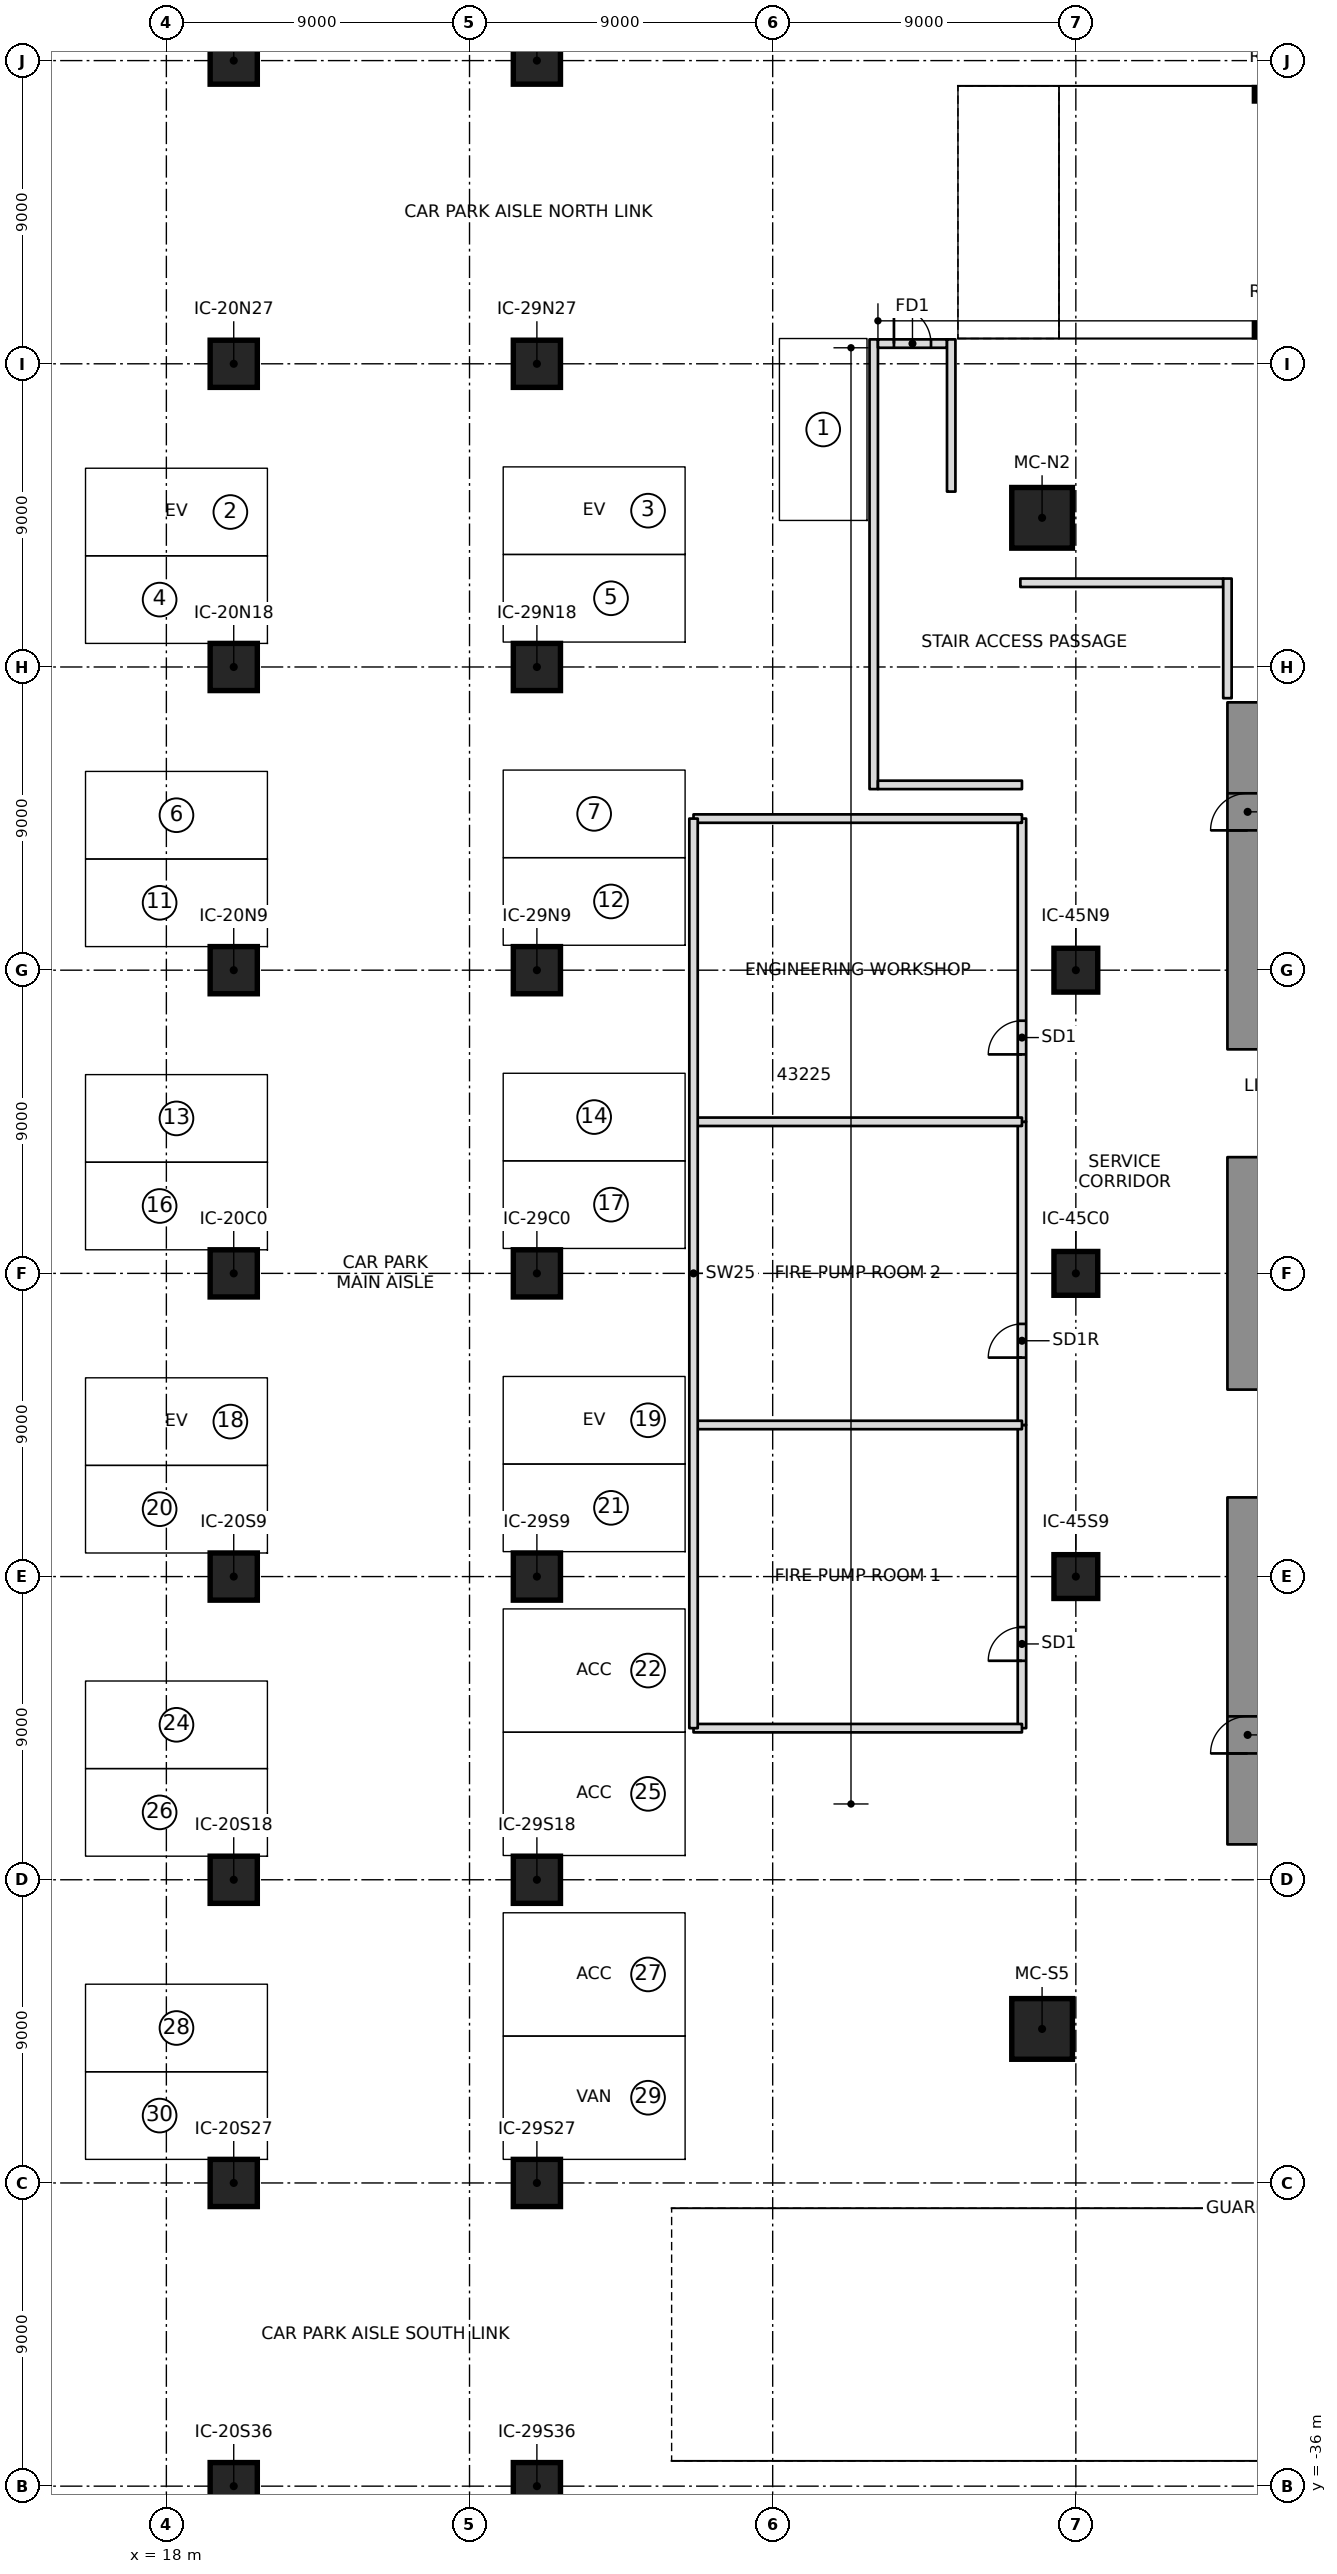
"""IFC4 building model, lengths in metres.
Left out: names, types, materials, properties, quantities, classifications, styles, units other than length and angle.
Written with IfcOpenShell. Run it as: python <this file> out.ifc"""

import sys

from ifc_helpers import new_model, si_unit, direction, frame, frame_2d, origin, origin_2d, place, context, subcontext, project, spatial, polyline, rectangle, outline, extrude, element, fill, save


model = new_model("IFC4")
c1 = context("Model", 3, precision=1e-05, world=origin(), true_north=direction((0.0, 1.0)))
c2 = subcontext(c1, "Body", "Model", "MODEL_VIEW")
j1 = project(units=[si_unit("LENGTHUNIT", "METRE"), si_unit("PLANEANGLEUNIT", "RADIAN")], contexts=[c1])
p1 = place(None, origin())
s1 = spatial("IfcSite", under=j1, at=p1, CompositionType="ELEMENT")
p2 = place(p1, origin())
s2 = spatial("IfcBuilding", under=s1, at=p2, CompositionType="ELEMENT")
p3 = place(p2, frame((0.0, 0.0, -5.0)))
s3 = spatial("IfcBuildingStorey", under=s2, at=p3, CompositionType="ELEMENT", Elevation=-5.0)
p4 = place(p3, frame((50.1, 6.65, 0.0), z_axis=(0.0, 0.0, 1.0), x_axis=(0.0, 1.0, 0.0)))
e1 = element("IfcWall", 1, at=p4, inside=s3, PredefinedType="SHEAR", context=c2, shape_type="SweptSolid", body=[
    extrude(rectangle(XDim=10.3, YDim=1.2, at=frame_2d((5.15, 0.0))), origin(), (0.0, 0.0, 1.0), 5.0),
])
p5 = place(p4, frame((6.5, 0.0, 0.0)))
e2 = element("IfcOpeningElement", 2, at=p5, cuts=e1, PredefinedType="OPENING", context=c2, shape_type="SweptSolid", body=[
    extrude(rectangle(XDim=1.1, YDim=2.1, at=frame_2d((0.55, 1.05))), frame((0.0, 0.61, 0.0), z_axis=(0.0, -1.0, 0.0), x_axis=(1.0, 0.0, 0.0)), (0.0, 0.0, 1.0), 1.22),
])
p6 = place(p3, frame((50.1, -3.45, 0.0), z_axis=(0.0, 0.0, 1.0), x_axis=(0.0, 1.0, 0.0)))
e3 = element("IfcWall", 3, at=p6, inside=s3, PredefinedType="SHEAR", context=c2, shape_type="SweptSolid", body=[
    extrude(rectangle(XDim=6.9, YDim=1.2, at=frame_2d((3.45, 0.0))), origin(), (0.0, 0.0, 1.0), 5.0),
])
p7 = place(p3, frame((50.1, -16.95, 0.0), z_axis=(0.0, 0.0, 1.0), x_axis=(0.0, 1.0, 0.0)))
e4 = element("IfcWall", 4, at=p7, inside=s3, PredefinedType="SHEAR", context=c2, shape_type="SweptSolid", body=[
    extrude(rectangle(XDim=10.3, YDim=1.2, at=frame_2d((5.15, 0.0))), origin(), (0.0, 0.0, 1.0), 5.0),
])
p8 = place(p7, frame((2.7, 0.0, 0.0)))
e5 = element("IfcOpeningElement", 5, at=p8, cuts=e4, PredefinedType="OPENING", context=c2, shape_type="SweptSolid", body=[
    extrude(rectangle(XDim=1.1, YDim=2.1, at=frame_2d((0.55, 1.05))), frame((0.0, 0.61, 0.0), z_axis=(0.0, -1.0, 0.0), x_axis=(1.0, 0.0, 0.0)), (0.0, 0.0, 1.0), 1.22),
])
for number, where, z_axis, x_axis in (
    (6, (43.998, -22.428, 0.0), (0.0, 0.0, 1.0), (1.0, 0.0, 0.0)),
    (7, (43.998, 22.428, 0.0), (0.0, 0.0, 1.0), (1.0, 0.0, 0.0)),
):
    element("IfcColumn", number, at=place(p3, frame(where, z_axis=z_axis, x_axis=x_axis)), inside=s3, PredefinedType="COLUMN", context=c2, shape_type="SweptSolid", body=[
        extrude(rectangle(XDim=1.8, YDim=1.8, at=origin_2d()), origin(), (0.0, 0.0, 1.0), 5.0),
    ])
for number, where, z_axis, x_axis in (
    (8, (20.0, -36.0, 0.0), (0.0, 0.0, 1.0), (1.0, 0.0, 0.0)),
    (9, (20.0, -27.0, 0.0), (0.0, 0.0, 1.0), (1.0, 0.0, 0.0)),
    (10, (20.0, -18.0, 0.0), (0.0, 0.0, 1.0), (1.0, 0.0, 0.0)),
    (11, (20.0, -9.0, 0.0), (0.0, 0.0, 1.0), (1.0, 0.0, 0.0)),
    (12, (20.0, 0.0, 0.0), (0.0, 0.0, 1.0), (1.0, 0.0, 0.0)),
    (13, (20.0, 9.0, 0.0), (0.0, 0.0, 1.0), (1.0, 0.0, 0.0)),
    (14, (20.0, 18.0, 0.0), (0.0, 0.0, 1.0), (1.0, 0.0, 0.0)),
    (15, (20.0, 27.0, 0.0), (0.0, 0.0, 1.0), (1.0, 0.0, 0.0)),
    (16, (20.0, 36.0, 0.0), (0.0, 0.0, 1.0), (1.0, 0.0, 0.0)),
    (17, (29.0, -36.0, 0.0), (0.0, 0.0, 1.0), (1.0, 0.0, 0.0)),
    (18, (29.0, -27.0, 0.0), (0.0, 0.0, 1.0), (1.0, 0.0, 0.0)),
    (19, (29.0, -18.0, 0.0), (0.0, 0.0, 1.0), (1.0, 0.0, 0.0)),
    (20, (29.0, -9.0, 0.0), (0.0, 0.0, 1.0), (1.0, 0.0, 0.0)),
    (21, (29.0, 0.0, 0.0), (0.0, 0.0, 1.0), (1.0, 0.0, 0.0)),
    (22, (29.0, 9.0, 0.0), (0.0, 0.0, 1.0), (1.0, 0.0, 0.0)),
    (23, (29.0, 18.0, 0.0), (0.0, 0.0, 1.0), (1.0, 0.0, 0.0)),
    (24, (29.0, 27.0, 0.0), (0.0, 0.0, 1.0), (1.0, 0.0, 0.0)),
    (25, (29.0, 36.0, 0.0), (0.0, 0.0, 1.0), (1.0, 0.0, 0.0)),
):
    element("IfcColumn", number, at=place(p3, frame(where, z_axis=z_axis, x_axis=x_axis)), inside=s3, PredefinedType="COLUMN", context=c2, shape_type="SweptSolid", body=[
        extrude(rectangle(XDim=1.4, YDim=1.4, at=origin_2d()), origin(), (0.0, 0.0, 1.0), 4.35),
    ])
for number, where, z_axis, x_axis in (
    (26, (45.0, -9.0, 0.0), (0.0, 0.0, 1.0), (1.0, 0.0, 0.0)),
    (27, (45.0, 0.0, 0.0), (0.0, 0.0, 1.0), (1.0, 0.0, 0.0)),
    (28, (45.0, 9.0, 0.0), (0.0, 0.0, 1.0), (1.0, 0.0, 0.0)),
):
    element("IfcColumn", number, at=place(p3, frame(where, z_axis=z_axis, x_axis=x_axis)), inside=s3, PredefinedType="COLUMN", context=c2, shape_type="SweptSolid", body=[
        extrude(rectangle(XDim=1.3, YDim=1.3, at=origin_2d()), origin(), (0.0, 0.0, 1.0), 5.0),
    ])
p9 = place(p2, frame((0.0, 0.0, -10.0)))
s4 = spatial("IfcBuildingStorey", under=s2, at=p9, CompositionType="ELEMENT", Elevation=-10.0)
for number, where, z_axis, x_axis in (
    (29, (41.69, -21.429, -0.3), (0.0, 0.0, 1.0), (0.888, -0.459, 0.0)),
    (30, (41.69, 21.429, -0.3), (0.0, 0.0, 1.0), (0.888, 0.459, 0.0)),
):
    element("IfcWall", number, at=place(p9, frame(where, z_axis=z_axis, x_axis=x_axis)), inside=s4, PredefinedType="SHEAR", context=c2, shape_type="SweptSolid", body=[
        extrude(rectangle(XDim=1.529, YDim=3.4, at=frame_2d((0.764, 0.0))), origin(), (0.0, 0.0, 1.0), 15.3),
    ])
for number, where, z_axis, x_axis in (
    (31, (50.5, 28.0, 0.0), (0.0, 0.0, 1.0), (1.0, 0.0, 0.0)),
    (32, (50.5, 35.0, 0.0), (0.0, 0.0, 1.0), (1.0, 0.0, 0.0)),
):
    element("IfcColumn", number, at=place(p3, frame(where, z_axis=z_axis, x_axis=x_axis)), inside=s3, PredefinedType="COLUMN", context=c2, shape_type="SweptSolid", body=[
        extrude(rectangle(XDim=0.4, YDim=0.4, at=origin_2d()), origin(), (0.0, 0.0, 1.0), 0.747),
    ])
p10 = place(p3, frame((43.4, -13.5, 0.0), z_axis=(0.0, 0.0, 1.0), x_axis=(0.0, 1.0, 0.0)))
e33 = element("IfcWall", 33, at=p10, inside=s3, PredefinedType="PARTITIONING", context=c2, shape_type="SweptSolid", body=[
    extrude(rectangle(XDim=9.0, YDim=0.25, at=frame_2d((4.5, 0.0))), origin(), (0.0, 0.0, 1.0), 4.65),
])
p11 = place(p10, frame((2.0, 0.0, 0.0)))
e34 = element("IfcOpeningElement", 34, at=p11, cuts=e33, PredefinedType="OPENING", context=c2, shape_type="SweptSolid", body=[
    extrude(rectangle(XDim=1.0, YDim=2.1, at=frame_2d((0.5, 1.05))), frame((0.0, 0.135, 0.0), z_axis=(0.0, -1.0, 0.0), x_axis=(1.0, 0.0, 0.0)), (0.0, 0.0, 1.0), 0.27),
])
p12 = place(p3, frame((43.4, -4.5, 0.0), z_axis=(0.0, 0.0, 1.0), x_axis=(0.0, 1.0, 0.0)))
e35 = element("IfcWall", 35, at=p12, inside=s3, PredefinedType="PARTITIONING", context=c2, shape_type="SweptSolid", body=[
    extrude(rectangle(XDim=9.0, YDim=0.25, at=frame_2d((4.5, 0.0))), origin(), (0.0, 0.0, 1.0), 4.65),
])
p13 = place(p12, frame((2.0, 0.0, 0.0)))
e36 = element("IfcOpeningElement", 36, at=p13, cuts=e35, PredefinedType="OPENING", context=c2, shape_type="SweptSolid", body=[
    extrude(rectangle(XDim=1.0, YDim=2.1, at=frame_2d((0.5, 1.05))), frame((0.0, 0.135, 0.0), z_axis=(0.0, -1.0, 0.0), x_axis=(1.0, 0.0, 0.0)), (0.0, 0.0, 1.0), 0.27),
])
p14 = place(p3, frame((33.65, -4.5, 0.0), z_axis=(0.0, 0.0, 1.0), x_axis=(1.0, 0.0, 0.0)))
e37 = element("IfcWall", 37, at=p14, inside=s3, PredefinedType="PARTITIONING", context=c2, shape_type="SweptSolid", body=[
    extrude(rectangle(XDim=9.75, YDim=0.25, at=frame_2d((4.875, 0.0))), origin(), (0.0, 0.0, 1.0), 4.65),
])
p15 = place(p3, frame((43.4, 4.5, 0.0), z_axis=(0.0, 0.0, 1.0), x_axis=(0.0, 1.0, 0.0)))
e38 = element("IfcWall", 38, at=p15, inside=s3, PredefinedType="PARTITIONING", context=c2, shape_type="SweptSolid", body=[
    extrude(rectangle(XDim=9.0, YDim=0.25, at=frame_2d((4.5, 0.0))), origin(), (0.0, 0.0, 1.0), 4.65),
])
p16 = place(p15, frame((2.0, 0.0, 0.0)))
e39 = element("IfcOpeningElement", 39, at=p16, cuts=e38, PredefinedType="OPENING", context=c2, shape_type="SweptSolid", body=[
    extrude(rectangle(XDim=1.0, YDim=2.1, at=frame_2d((0.5, 1.05))), frame((0.0, 0.135, 0.0), z_axis=(0.0, -1.0, 0.0), x_axis=(1.0, 0.0, 0.0)), (0.0, 0.0, 1.0), 0.27),
])
for number, where, z_axis, x_axis in (
    (40, (33.65, 4.5, 0.0), (0.0, 0.0, 1.0), (1.0, 0.0, 0.0)),
    (41, (33.65, -13.5, 0.0), (0.0, 0.0, 1.0), (1.0, 0.0, 0.0)),
    (42, (33.65, 13.5, 0.0), (0.0, 0.0, 1.0), (1.0, 0.0, 0.0)),
):
    element("IfcWall", number, at=place(p3, frame(where, z_axis=z_axis, x_axis=x_axis)), inside=s3, PredefinedType="PARTITIONING", context=c2, shape_type="SweptSolid", body=[
        extrude(rectangle(XDim=9.75, YDim=0.25, at=frame_2d((4.875, 0.0))), origin(), (0.0, 0.0, 1.0), 4.65),
    ])
p17 = place(p3, frame((33.65, -13.5, 0.0), z_axis=(0.0, 0.0, 1.0), x_axis=(0.0, 1.0, 0.0)))
e43 = element("IfcWall", 43, at=p17, inside=s3, PredefinedType="PARTITIONING", context=c2, shape_type="SweptSolid", body=[
    extrude(rectangle(XDim=27.0, YDim=0.25, at=frame_2d((13.5, 0.0))), origin(), (0.0, 0.0, 1.0), 4.65),
])
p18 = place(p3, frame((39.0, 14.375, 0.0), z_axis=(0.0, 0.0, 1.0), x_axis=(0.0, 1.0, 0.0)))
e44 = element("IfcWall", 44, at=p18, inside=s3, PredefinedType="PARTITIONING", context=c2, shape_type="SweptSolid", body=[
    extrude(rectangle(XDim=13.35, YDim=0.25, at=frame_2d((6.675, 0.0))), origin(), (0.0, 0.0, 1.0), 4.65),
])
p19 = place(p3, frame((39.125, 14.5, 0.0), z_axis=(0.0, 0.0, 1.0), x_axis=(1.0, 0.0, 0.0)))
e45 = element("IfcWall", 45, at=p19, inside=s3, PredefinedType="PARTITIONING", context=c2, shape_type="SweptSolid", body=[
    extrude(rectangle(XDim=4.275, YDim=0.25, at=frame_2d((2.137, 0.0))), origin(), (0.0, 0.0, 1.0), 4.65),
])
p20 = place(p3, frame((39.125, 27.6, 0.0), z_axis=(0.0, 0.0, 1.0), x_axis=(1.0, 0.0, 0.0)))
e46 = element("IfcWall", 46, at=p20, inside=s3, PredefinedType="PARTITIONING", context=c2, shape_type="SweptSolid", body=[
    extrude(rectangle(XDim=2.05, YDim=0.25, at=frame_2d((1.025, 0.0))), origin(), (0.0, 0.0, 1.0), 4.65),
])
p21 = place(p20, frame((0.475, 0.0, 0.0)))
e47 = element("IfcOpeningElement", 47, at=p21, cuts=e46, PredefinedType="OPENING", context=c2, shape_type="SweptSolid", body=[
    extrude(rectangle(XDim=1.1, YDim=2.1, at=frame_2d((0.55, 1.05))), frame((0.0, 0.135, 0.0), z_axis=(0.0, -1.0, 0.0), x_axis=(1.0, 0.0, 0.0)), (0.0, 0.0, 1.0), 0.27),
])
p22 = place(p3, frame((41.3, 23.141, 0.0), z_axis=(0.0, 0.0, 1.0), x_axis=(0.0, 1.0, 0.0)))
e48 = element("IfcWall", 48, at=p22, inside=s3, PredefinedType="PARTITIONING", context=c2, shape_type="SweptSolid", body=[
    extrude(outline(polyline([(0.065, -0.125), (4.584, -0.125), (4.584, 0.125), (-0.065, 0.125), (0.065, -0.125)])), origin(), (0.0, 0.0, 1.0), 4.65),
])
p23 = place(p3, frame((43.595, 20.5, 0.0), z_axis=(0.0, 0.0, 1.0), x_axis=(1.0, 0.0, 0.0)))
e49 = element("IfcWall", 49, at=p23, inside=s3, PredefinedType="PARTITIONING", context=c2, shape_type="SweptSolid", body=[
    extrude(outline(polyline([(-0.242, -0.125), (5.78, -0.125), (5.78, 0.125), (0.242, 0.125), (-0.242, -0.125)])), origin(), (0.0, 0.0, 1.0), 4.65),
])
p24 = place(p3, frame((49.5, 17.074, 0.0), z_axis=(0.0, 0.0, 1.0), x_axis=(0.0, 1.0, 0.0)))
e50 = element("IfcWall", 50, at=p24, inside=s3, PredefinedType="PARTITIONING", context=c2, shape_type="SweptSolid", body=[
    extrude(rectangle(XDim=3.551, YDim=0.25, at=frame_2d((1.775, 0.0))), origin(), (0.0, 0.0, 1.0), 4.65),
])
p25 = place(p5, origin())
e51 = element("IfcDoor", 51, at=p25, inside=s3, OperationType="SINGLE_SWING_RIGHT", PredefinedType="DOOR", context=c2, shape_type="SweptSolid", body=[
    extrude(rectangle(XDim=1.1, YDim=2.1, at=frame_2d((0.55, 1.05))), frame((0.0, 0.025, 0.0), z_axis=(0.0, -1.0, 0.0), x_axis=(1.0, 0.0, 0.0)), (0.0, 0.0, 1.0), 0.05),
])
fill(e2, e51)
p26 = place(p8, origin())
e52 = element("IfcDoor", 52, at=p26, inside=s3, OperationType="SINGLE_SWING_RIGHT", PredefinedType="DOOR", context=c2, shape_type="SweptSolid", body=[
    extrude(rectangle(XDim=1.1, YDim=2.1, at=frame_2d((0.55, 1.05))), frame((0.0, 0.025, 0.0), z_axis=(0.0, -1.0, 0.0), x_axis=(1.0, 0.0, 0.0)), (0.0, 0.0, 1.0), 0.05),
])
fill(e5, e52)
p27 = place(p11, origin())
e53 = element("IfcDoor", 53, at=p27, inside=s3, OperationType="SINGLE_SWING_LEFT", PredefinedType="DOOR", context=c2, shape_type="SweptSolid", body=[
    extrude(rectangle(XDim=1.0, YDim=2.1, at=frame_2d((0.5, 1.05))), frame((0.0, 0.025, 0.0), z_axis=(0.0, -1.0, 0.0), x_axis=(1.0, 0.0, 0.0)), (0.0, 0.0, 1.0), 0.05),
])
fill(e34, e53)
p28 = place(p13, origin())
e54 = element("IfcDoor", 54, at=p28, inside=s3, OperationType="SINGLE_SWING_RIGHT", PredefinedType="DOOR", context=c2, shape_type="SweptSolid", body=[
    extrude(rectangle(XDim=1.0, YDim=2.1, at=frame_2d((0.5, 1.05))), frame((0.0, 0.025, 0.0), z_axis=(0.0, -1.0, 0.0), x_axis=(1.0, 0.0, 0.0)), (0.0, 0.0, 1.0), 0.05),
])
fill(e36, e54)
p29 = place(p16, origin())
e55 = element("IfcDoor", 55, at=p29, inside=s3, OperationType="SINGLE_SWING_LEFT", PredefinedType="DOOR", context=c2, shape_type="SweptSolid", body=[
    extrude(rectangle(XDim=1.0, YDim=2.1, at=frame_2d((0.5, 1.05))), frame((0.0, 0.025, 0.0), z_axis=(0.0, -1.0, 0.0), x_axis=(1.0, 0.0, 0.0)), (0.0, 0.0, 1.0), 0.05),
])
fill(e39, e55)
p30 = place(p21, origin())
e56 = element("IfcDoor", 56, at=p30, inside=s3, OperationType="SINGLE_SWING_RIGHT", PredefinedType="DOOR", context=c2, shape_type="SweptSolid", body=[
    extrude(rectangle(XDim=1.1, YDim=2.1, at=frame_2d((0.55, 1.05))), frame((0.0, 0.025, 0.0), z_axis=(0.0, -1.0, 0.0), x_axis=(1.0, 0.0, 0.0)), (0.0, 0.0, 1.0), 0.05),
])
fill(e47, e56)
save(model, sys.argv[1])
